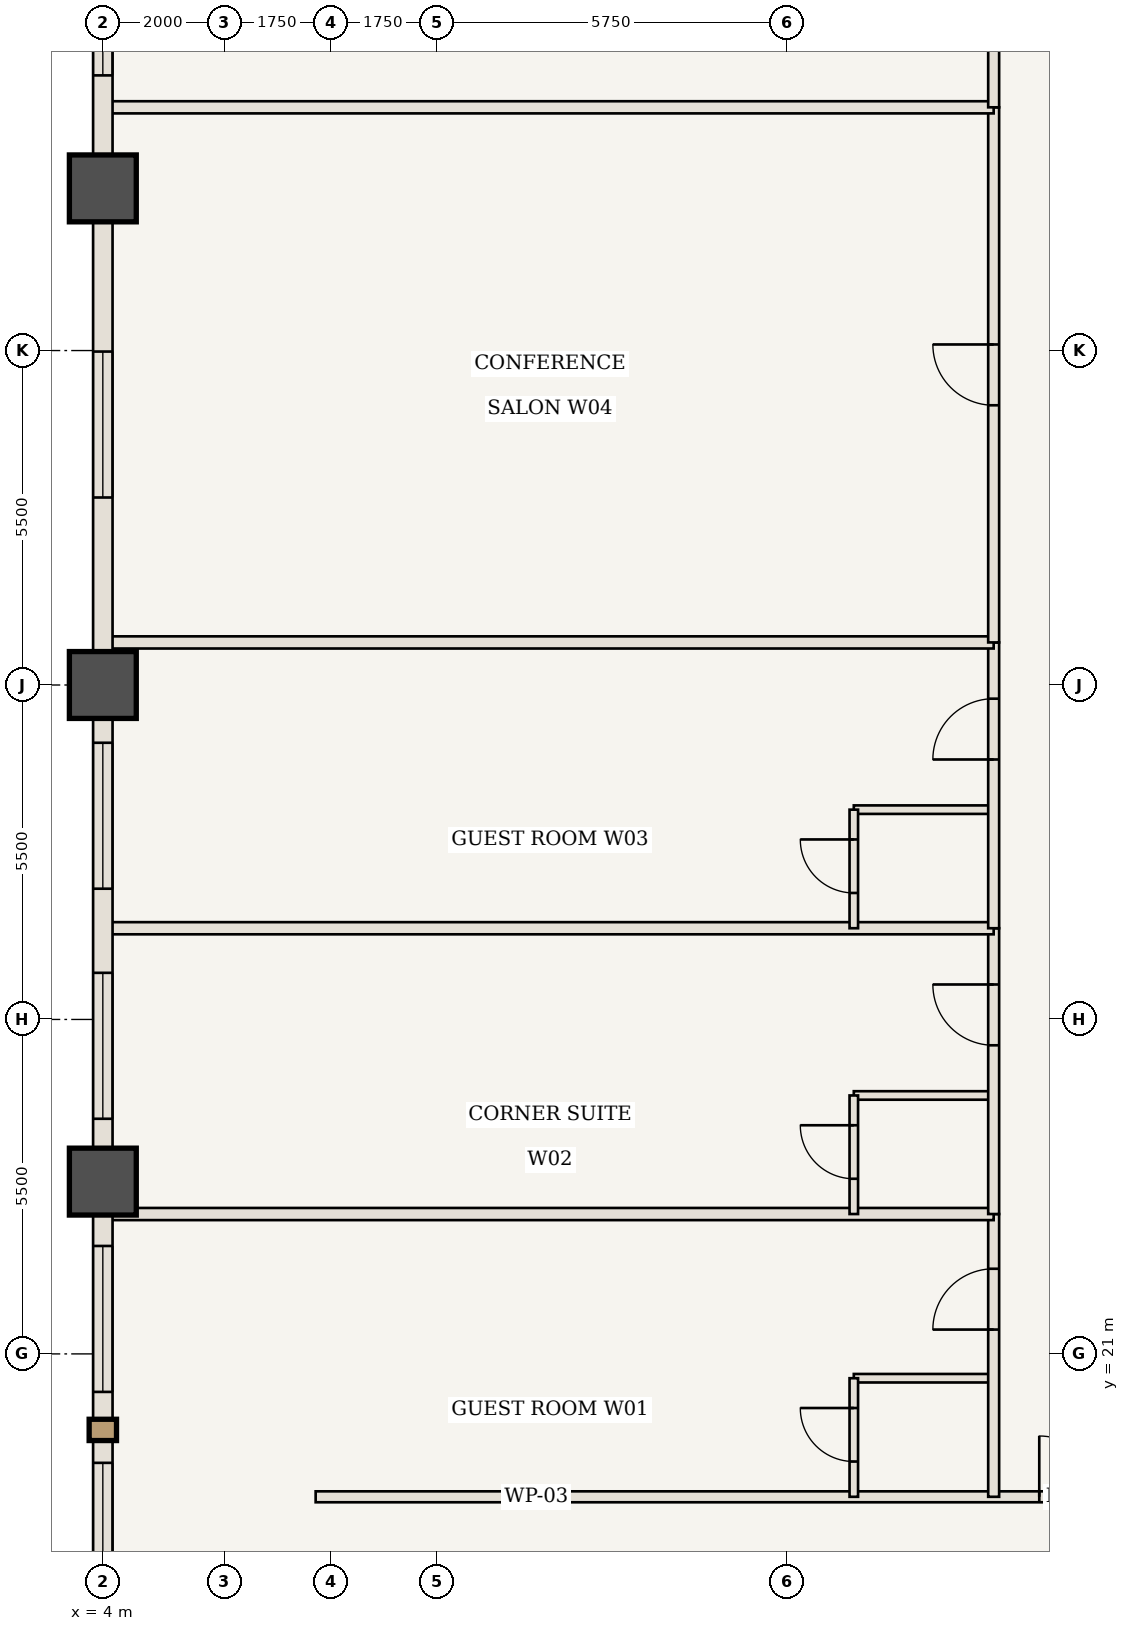
"""IFC4 building model, lengths in metres.
Left out: names, types, materials, properties, quantities, classifications, styles, units other than length and angle.
Written with IfcOpenShell. Run it as: python <this file> out.ifc"""

import sys

from ifc_helpers import new_model, si_unit, direction, frame, frame_2d, origin, origin_2d, place, context, subcontext, project, spatial, rectangle, extrude, element, fill, save


model = new_model("IFC4")
c1 = context("Model", 3, precision=1e-05, world=origin(), true_north=direction((0.0, 1.0)))
c2 = subcontext(c1, "Body", "Model", "MODEL_VIEW")
j1 = project(units=[si_unit("LENGTHUNIT", "METRE"), si_unit("PLANEANGLEUNIT", "RADIAN")], contexts=[c1])
p1 = place(None, origin())
s1 = spatial("IfcSite", under=j1, at=p1, CompositionType="ELEMENT")
p2 = place(p1, origin())
s2 = spatial("IfcBuilding", under=s1, at=p2, CompositionType="ELEMENT")
p3 = place(p2, frame((0.0, 0.0, 59.85)))
s3 = spatial("IfcBuildingStorey", under=s2, at=p3, CompositionType="ELEMENT", Elevation=59.85)
for number, where, z_axis, x_axis in (
    (1, (4.0, 23.833, 0.0), (0.0, 0.0, 1.0), (1.0, 0.0, 0.0)),
    (2, (4.0, 32.0, 0.0), (0.0, 0.0, 1.0), (1.0, 0.0, 0.0)),
    (3, (4.0, 40.167, 0.0), (0.0, 0.0, 1.0), (1.0, 0.0, 0.0)),
):
    element("IfcColumn", number, at=place(p3, frame(where, z_axis=z_axis, x_axis=x_axis)), inside=s3, PredefinedType="COLUMN", context=c2, shape_type="SweptSolid", body=[
        extrude(rectangle(XDim=1.1, YDim=1.1, at=origin_2d()), origin(), (0.0, 0.0, 1.0), 3.5),
    ])
p4 = place(p3, frame((7.5, 18.65, 0.0), z_axis=(0.0, 0.0, 1.0), x_axis=(1.0, 0.0, 0.0)))
e4 = element("IfcWall", 4, at=p4, inside=s3, PredefinedType="STANDARD", context=c2, shape_type="SweptSolid", body=[
    extrude(rectangle(XDim=16.5, YDim=0.18, at=frame_2d((8.25, 0.0))), origin(), (0.0, 0.0, 1.0), 3.32),
])
p5 = place(p4, frame((11.9, 0.0, 0.0)))
e5 = element("IfcOpeningElement", 5, at=p5, cuts=e4, PredefinedType="OPENING", context=c2, shape_type="SweptSolid", body=[
    extrude(rectangle(XDim=1.0, YDim=2.15, at=frame_2d((0.5, 1.075))), frame((0.0, 0.1, 0.0), z_axis=(0.0, -1.0, 0.0), x_axis=(1.0, 0.0, 0.0)), (0.0, 0.0, 1.0), 0.2),
])
p6 = place(p3, frame((16.35, 20.6, 0.0), z_axis=(0.0, 0.0, 1.0), x_axis=(1.0, 0.0, 0.0)))
e6 = element("IfcWall", 6, at=p6, inside=s3, PredefinedType="STANDARD", context=c2, shape_type="SweptSolid", body=[
    extrude(rectangle(XDim=2.3, YDim=0.14, at=frame_2d((1.15, 0.0))), origin(), (0.0, 0.0, 1.0), 2.615),
])
p7 = place(p3, frame((16.35, 18.65, 0.0), z_axis=(0.0, 0.0, 1.0), x_axis=(0.0, 1.0, 0.0)))
e7 = element("IfcWall", 7, at=p7, inside=s3, PredefinedType="STANDARD", context=c2, shape_type="SweptSolid", body=[
    extrude(rectangle(XDim=1.95, YDim=0.14, at=frame_2d((0.975, 0.0))), origin(), (0.0, 0.0, 1.0), 3.32),
])
p8 = place(p7, frame((0.58, 0.0, 0.0)))
e8 = element("IfcOpeningElement", 8, at=p8, cuts=e7, PredefinedType="OPENING", context=c2, shape_type="SweptSolid", body=[
    extrude(rectangle(XDim=0.88, YDim=2.1, at=frame_2d((0.44, 1.05))), frame((0.0, 0.08, 0.0), z_axis=(0.0, -1.0, 0.0), x_axis=(1.0, 0.0, 0.0)), (0.0, 0.0, 1.0), 0.16),
])
p9 = place(p3, frame((18.65, 18.65, 0.0), z_axis=(0.0, 0.0, 1.0), x_axis=(0.0, 1.0, 0.0)))
e9 = element("IfcWall", 9, at=p9, inside=s3, PredefinedType="STANDARD", context=c2, shape_type="SweptSolid", body=[
    extrude(rectangle(XDim=4.65, YDim=0.18, at=frame_2d((2.325, 0.0))), origin(), (0.0, 0.0, 1.0), 3.32),
])
p10 = place(p9, frame((2.75, 0.0, 0.0)))
e10 = element("IfcOpeningElement", 10, at=p10, cuts=e9, PredefinedType="OPENING", context=c2, shape_type="SweptSolid", body=[
    extrude(rectangle(XDim=1.0, YDim=2.15, at=frame_2d((0.5, 1.075))), frame((0.0, 0.1, 0.0), z_axis=(0.0, -1.0, 0.0), x_axis=(1.0, 0.0, 0.0)), (0.0, 0.0, 1.0), 0.2),
])
p11 = place(p3, frame((4.06, 23.3, 0.0), z_axis=(0.0, 0.0, 1.0), x_axis=(1.0, 0.0, 0.0)))
e11 = element("IfcWall", 11, at=p11, inside=s3, PredefinedType="STANDARD", context=c2, shape_type="SweptSolid", body=[
    extrude(rectangle(XDim=14.59, YDim=0.2, at=frame_2d((7.295, 0.0))), origin(), (0.0, 0.0, 1.0), 3.32),
])
p12 = place(p3, frame((16.35, 25.25, 0.0), z_axis=(0.0, 0.0, 1.0), x_axis=(1.0, 0.0, 0.0)))
e12 = element("IfcWall", 12, at=p12, inside=s3, PredefinedType="STANDARD", context=c2, shape_type="SweptSolid", body=[
    extrude(rectangle(XDim=2.3, YDim=0.14, at=frame_2d((1.15, 0.0))), origin(), (0.0, 0.0, 1.0), 3.32),
])
p13 = place(p3, frame((16.35, 23.3, 0.0), z_axis=(0.0, 0.0, 1.0), x_axis=(0.0, 1.0, 0.0)))
e13 = element("IfcWall", 13, at=p13, inside=s3, PredefinedType="STANDARD", context=c2, shape_type="SweptSolid", body=[
    extrude(rectangle(XDim=1.95, YDim=0.14, at=frame_2d((0.975, 0.0))), origin(), (0.0, 0.0, 1.0), 3.32),
])
p14 = place(p13, frame((0.58, 0.0, 0.0)))
e14 = element("IfcOpeningElement", 14, at=p14, cuts=e13, PredefinedType="OPENING", context=c2, shape_type="SweptSolid", body=[
    extrude(rectangle(XDim=0.88, YDim=2.1, at=frame_2d((0.44, 1.05))), frame((0.0, 0.08, 0.0), z_axis=(0.0, -1.0, 0.0), x_axis=(1.0, 0.0, 0.0)), (0.0, 0.0, 1.0), 0.16),
])
p15 = place(p3, frame((18.65, 23.3, 0.0), z_axis=(0.0, 0.0, 1.0), x_axis=(0.0, 1.0, 0.0)))
e15 = element("IfcWall", 15, at=p15, inside=s3, PredefinedType="STANDARD", context=c2, shape_type="SweptSolid", body=[
    extrude(rectangle(XDim=4.7, YDim=0.18, at=frame_2d((2.35, 0.0))), origin(), (0.0, 0.0, 1.0), 3.32),
])
p16 = place(p15, frame((2.775, 0.0, 0.0)))
e16 = element("IfcOpeningElement", 16, at=p16, cuts=e15, PredefinedType="OPENING", context=c2, shape_type="SweptSolid", body=[
    extrude(rectangle(XDim=1.0, YDim=2.15, at=frame_2d((0.5, 1.075))), frame((0.0, 0.1, 0.0), z_axis=(0.0, -1.0, 0.0), x_axis=(1.0, 0.0, 0.0)), (0.0, 0.0, 1.0), 0.2),
])
p17 = place(p3, frame((4.06, 28.0, 0.0), z_axis=(0.0, 0.0, 1.0), x_axis=(1.0, 0.0, 0.0)))
e17 = element("IfcWall", 17, at=p17, inside=s3, PredefinedType="STANDARD", context=c2, shape_type="SweptSolid", body=[
    extrude(rectangle(XDim=14.59, YDim=0.2, at=frame_2d((7.295, 0.0))), origin(), (0.0, 0.0, 1.0), 3.32),
])
p18 = place(p3, frame((16.35, 29.95, 0.0), z_axis=(0.0, 0.0, 1.0), x_axis=(1.0, 0.0, 0.0)))
e18 = element("IfcWall", 18, at=p18, inside=s3, PredefinedType="STANDARD", context=c2, shape_type="SweptSolid", body=[
    extrude(rectangle(XDim=2.3, YDim=0.14, at=frame_2d((1.15, 0.0))), origin(), (0.0, 0.0, 1.0), 3.32),
])
p19 = place(p3, frame((16.35, 28.0, 0.0), z_axis=(0.0, 0.0, 1.0), x_axis=(0.0, 1.0, 0.0)))
e19 = element("IfcWall", 19, at=p19, inside=s3, PredefinedType="STANDARD", context=c2, shape_type="SweptSolid", body=[
    extrude(rectangle(XDim=1.95, YDim=0.14, at=frame_2d((0.975, 0.0))), origin(), (0.0, 0.0, 1.0), 3.32),
])
p20 = place(p19, frame((0.58, 0.0, 0.0)))
e20 = element("IfcOpeningElement", 20, at=p20, cuts=e19, PredefinedType="OPENING", context=c2, shape_type="SweptSolid", body=[
    extrude(rectangle(XDim=0.88, YDim=2.1, at=frame_2d((0.44, 1.05))), frame((0.0, 0.08, 0.0), z_axis=(0.0, -1.0, 0.0), x_axis=(1.0, 0.0, 0.0)), (0.0, 0.0, 1.0), 0.16),
])
p21 = place(p3, frame((18.65, 28.0, 0.0), z_axis=(0.0, 0.0, 1.0), x_axis=(0.0, 1.0, 0.0)))
e21 = element("IfcWall", 21, at=p21, inside=s3, PredefinedType="STANDARD", context=c2, shape_type="SweptSolid", body=[
    extrude(rectangle(XDim=4.7, YDim=0.18, at=frame_2d((2.35, 0.0))), origin(), (0.0, 0.0, 1.0), 3.32),
])
p22 = place(p21, frame((2.775, 0.0, 0.0)))
e22 = element("IfcOpeningElement", 22, at=p22, cuts=e21, PredefinedType="OPENING", context=c2, shape_type="SweptSolid", body=[
    extrude(rectangle(XDim=1.0, YDim=2.15, at=frame_2d((0.5, 1.075))), frame((0.0, 0.1, 0.0), z_axis=(0.0, -1.0, 0.0), x_axis=(1.0, 0.0, 0.0)), (0.0, 0.0, 1.0), 0.2),
])
p23 = place(p3, frame((4.06, 32.7, 0.0), z_axis=(0.0, 0.0, 1.0), x_axis=(1.0, 0.0, 0.0)))
e23 = element("IfcWall", 23, at=p23, inside=s3, PredefinedType="STANDARD", context=c2, shape_type="SweptSolid", body=[
    extrude(rectangle(XDim=14.59, YDim=0.2, at=frame_2d((7.295, 0.0))), origin(), (0.0, 0.0, 1.0), 3.32),
])
p24 = place(p3, frame((18.65, 32.7, 0.0), z_axis=(0.0, 0.0, 1.0), x_axis=(0.0, 1.0, 0.0)))
e24 = element("IfcWall", 24, at=p24, inside=s3, PredefinedType="STANDARD", context=c2, shape_type="SweptSolid", body=[
    extrude(rectangle(XDim=8.8, YDim=0.18, at=frame_2d((4.4, 0.0))), origin(), (0.0, 0.0, 1.0), 3.32),
])
p25 = place(p24, frame((3.9, 0.0, 0.0)))
e25 = element("IfcOpeningElement", 25, at=p25, cuts=e24, PredefinedType="OPENING", context=c2, shape_type="SweptSolid", body=[
    extrude(rectangle(XDim=1.0, YDim=2.15, at=frame_2d((0.5, 1.075))), frame((0.0, 0.1, 0.0), z_axis=(0.0, -1.0, 0.0), x_axis=(1.0, 0.0, 0.0)), (0.0, 0.0, 1.0), 0.2),
])
p26 = place(p3, frame((4.06, 41.5, 0.0), z_axis=(0.0, 0.0, 1.0), x_axis=(1.0, 0.0, 0.0)))
e26 = element("IfcWall", 26, at=p26, inside=s3, PredefinedType="STANDARD", context=c2, shape_type="SweptSolid", body=[
    extrude(rectangle(XDim=14.59, YDim=0.2, at=frame_2d((7.295, 0.0))), origin(), (0.0, 0.0, 1.0), 3.32),
])
p27 = place(p3, frame((18.65, 41.5, 0.0), z_axis=(0.0, 0.0, 1.0), x_axis=(0.0, 1.0, 0.0)))
e27 = element("IfcWall", 27, at=p27, inside=s3, PredefinedType="STANDARD", context=c2, shape_type="SweptSolid", body=[
    extrude(rectangle(XDim=3.85, YDim=0.18, at=frame_2d((1.925, 0.0))), origin(), (0.0, 0.0, 1.0), 3.32),
])
p28 = place(p27, frame((1.425, 0.0, 0.0)))
e28 = element("IfcOpeningElement", 28, at=p28, cuts=e27, PredefinedType="OPENING", context=c2, shape_type="SweptSolid", body=[
    extrude(rectangle(XDim=1.0, YDim=2.15, at=frame_2d((0.5, 1.075))), frame((0.0, 0.1, 0.0), z_axis=(0.0, -1.0, 0.0), x_axis=(1.0, 0.0, 0.0)), (0.0, 0.0, 1.0), 0.2),
])
p29 = place(p3, frame((4.0, 15.667, 0.0), z_axis=(0.0, 0.0, 1.0), x_axis=(0.0, 1.0, 0.0)))
e29 = element("IfcWall", 29, at=p29, inside=s3, PredefinedType="USERDEFINED", context=c2, shape_type="SweptSolid", body=[
    extrude(rectangle(XDim=8.167, YDim=0.32, at=frame_2d((4.083, 0.0))), origin(), (0.0, 0.0, 1.0), 2.52),
])
p30 = place(p29, frame((0.742, 0.0, 0.85)))
e30 = element("IfcOpeningElement", 30, at=p30, cuts=e29, PredefinedType="OPENING", context=c2, shape_type="SweptSolid", body=[
    extrude(rectangle(XDim=2.8, YDim=1.47, at=frame_2d((1.4, 0.735))), frame((0.0, 0.17, 0.0), z_axis=(0.0, -1.0, 0.0), x_axis=(1.0, 0.0, 0.0)), (0.0, 0.0, 1.0), 0.34),
])
p31 = place(p29, frame((4.708, 0.0, 0.85)))
e31 = element("IfcOpeningElement", 31, at=p31, cuts=e29, PredefinedType="OPENING", context=c2, shape_type="SweptSolid", body=[
    extrude(rectangle(XDim=2.4, YDim=1.47, at=frame_2d((1.2, 0.735))), frame((0.0, 0.17, 0.0), z_axis=(0.0, -1.0, 0.0), x_axis=(1.0, 0.0, 0.0)), (0.0, 0.0, 1.0), 0.34),
])
p32 = place(p3, frame((4.0, 23.833, 0.0), z_axis=(0.0, 0.0, 1.0), x_axis=(0.0, 1.0, 0.0)))
e32 = element("IfcWall", 32, at=p32, inside=s3, PredefinedType="USERDEFINED", context=c2, shape_type="SweptSolid", body=[
    extrude(rectangle(XDim=8.167, YDim=0.32, at=frame_2d((4.083, 0.0))), origin(), (0.0, 0.0, 1.0), 2.52),
])
p33 = place(p32, frame((1.033, 0.0, 0.85)))
e33 = element("IfcOpeningElement", 33, at=p33, cuts=e32, PredefinedType="OPENING", context=c2, shape_type="SweptSolid", body=[
    extrude(rectangle(XDim=2.4, YDim=1.47, at=frame_2d((1.2, 0.735))), frame((0.0, 0.17, 0.0), z_axis=(0.0, -1.0, 0.0), x_axis=(1.0, 0.0, 0.0)), (0.0, 0.0, 1.0), 0.34),
])
p34 = place(p32, frame((4.817, 0.0, 0.85)))
e34 = element("IfcOpeningElement", 34, at=p34, cuts=e32, PredefinedType="OPENING", context=c2, shape_type="SweptSolid", body=[
    extrude(rectangle(XDim=2.4, YDim=1.47, at=frame_2d((1.2, 0.735))), frame((0.0, 0.17, 0.0), z_axis=(0.0, -1.0, 0.0), x_axis=(1.0, 0.0, 0.0)), (0.0, 0.0, 1.0), 0.34),
])
p35 = place(p3, frame((4.0, 32.0, 0.0), z_axis=(0.0, 0.0, 1.0), x_axis=(0.0, 1.0, 0.0)))
e35 = element("IfcWall", 35, at=p35, inside=s3, PredefinedType="USERDEFINED", context=c2, shape_type="SweptSolid", body=[
    extrude(rectangle(XDim=8.167, YDim=0.32, at=frame_2d((4.083, 0.0))), origin(), (0.0, 0.0, 1.0), 2.52),
])
p36 = place(p35, frame((3.083, 0.0, 0.85)))
e36 = element("IfcOpeningElement", 36, at=p36, cuts=e35, PredefinedType="OPENING", context=c2, shape_type="SweptSolid", body=[
    extrude(rectangle(XDim=2.4, YDim=1.47, at=frame_2d((1.2, 0.735))), frame((0.0, 0.17, 0.0), z_axis=(0.0, -1.0, 0.0), x_axis=(1.0, 0.0, 0.0)), (0.0, 0.0, 1.0), 0.34),
])
p37 = place(p3, frame((4.0, 40.167, 0.0), z_axis=(0.0, 0.0, 1.0), x_axis=(0.0, 1.0, 0.0)))
e37 = element("IfcWall", 37, at=p37, inside=s3, PredefinedType="USERDEFINED", context=c2, shape_type="SweptSolid", body=[
    extrude(rectangle(XDim=8.167, YDim=0.32, at=frame_2d((4.083, 0.0))), origin(), (0.0, 0.0, 1.0), 2.52),
])
p38 = place(p37, frame((1.858, 0.0, 0.85)))
e38 = element("IfcOpeningElement", 38, at=p38, cuts=e37, PredefinedType="OPENING", context=c2, shape_type="SweptSolid", body=[
    extrude(rectangle(XDim=1.6, YDim=1.47, at=frame_2d((0.8, 0.735))), frame((0.0, 0.17, 0.0), z_axis=(0.0, -1.0, 0.0), x_axis=(1.0, 0.0, 0.0)), (0.0, 0.0, 1.0), 0.34),
])
p39 = place(p37, frame((4.625, 0.0, 0.85)))
e39 = element("IfcOpeningElement", 39, at=p39, cuts=e37, PredefinedType="OPENING", context=c2, shape_type="SweptSolid", body=[
    extrude(rectangle(XDim=2.8, YDim=1.47, at=frame_2d((1.4, 0.735))), frame((0.0, 0.17, 0.0), z_axis=(0.0, -1.0, 0.0), x_axis=(1.0, 0.0, 0.0)), (0.0, 0.0, 1.0), 0.34),
])
p40 = place(p5, origin())
e40 = element("IfcDoor", 40, at=p40, inside=s3, OperationType="SINGLE_SWING_LEFT", PredefinedType="DOOR", context=c2, shape_type="SweptSolid", body=[
    extrude(rectangle(XDim=1.0, YDim=2.15, at=frame_2d((0.5, 1.075))), frame((0.0, 0.025, 0.0), z_axis=(0.0, -1.0, 0.0), x_axis=(1.0, 0.0, 0.0)), (0.0, 0.0, 1.0), 0.05),
])
fill(e5, e40)
p41 = place(p8, origin())
e41 = element("IfcDoor", 41, at=p41, inside=s3, OperationType="SINGLE_SWING_RIGHT", PredefinedType="DOOR", context=c2, shape_type="SweptSolid", body=[
    extrude(rectangle(XDim=0.88, YDim=2.1, at=frame_2d((0.44, 1.05))), frame((0.0, 0.025, 0.0), z_axis=(0.0, -1.0, 0.0), x_axis=(1.0, 0.0, 0.0)), (0.0, 0.0, 1.0), 0.05),
])
fill(e8, e41)
p42 = place(p10, origin())
e42 = element("IfcDoor", 42, at=p42, inside=s3, OperationType="SINGLE_SWING_LEFT", PredefinedType="DOOR", context=c2, shape_type="SweptSolid", body=[
    extrude(rectangle(XDim=1.0, YDim=2.15, at=frame_2d((0.5, 1.075))), frame((0.0, 0.025, 0.0), z_axis=(0.0, -1.0, 0.0), x_axis=(1.0, 0.0, 0.0)), (0.0, 0.0, 1.0), 0.05),
])
fill(e10, e42)
p43 = place(p14, origin())
e43 = element("IfcDoor", 43, at=p43, inside=s3, OperationType="SINGLE_SWING_RIGHT", PredefinedType="DOOR", context=c2, shape_type="SweptSolid", body=[
    extrude(rectangle(XDim=0.88, YDim=2.1, at=frame_2d((0.44, 1.05))), frame((0.0, 0.025, 0.0), z_axis=(0.0, -1.0, 0.0), x_axis=(1.0, 0.0, 0.0)), (0.0, 0.0, 1.0), 0.05),
])
fill(e14, e43)
p44 = place(p16, origin())
e44 = element("IfcDoor", 44, at=p44, inside=s3, OperationType="SINGLE_SWING_RIGHT", PredefinedType="DOOR", context=c2, shape_type="SweptSolid", body=[
    extrude(rectangle(XDim=1.0, YDim=2.15, at=frame_2d((0.5, 1.075))), frame((0.0, 0.025, 0.0), z_axis=(0.0, -1.0, 0.0), x_axis=(1.0, 0.0, 0.0)), (0.0, 0.0, 1.0), 0.05),
])
fill(e16, e44)
p45 = place(p20, origin())
e45 = element("IfcDoor", 45, at=p45, inside=s3, OperationType="SINGLE_SWING_RIGHT", PredefinedType="DOOR", context=c2, shape_type="SweptSolid", body=[
    extrude(rectangle(XDim=0.88, YDim=2.1, at=frame_2d((0.44, 1.05))), frame((0.0, 0.025, 0.0), z_axis=(0.0, -1.0, 0.0), x_axis=(1.0, 0.0, 0.0)), (0.0, 0.0, 1.0), 0.05),
])
fill(e20, e45)
p46 = place(p22, origin())
e46 = element("IfcDoor", 46, at=p46, inside=s3, OperationType="SINGLE_SWING_LEFT", PredefinedType="DOOR", context=c2, shape_type="SweptSolid", body=[
    extrude(rectangle(XDim=1.0, YDim=2.15, at=frame_2d((0.5, 1.075))), frame((0.0, 0.025, 0.0), z_axis=(0.0, -1.0, 0.0), x_axis=(1.0, 0.0, 0.0)), (0.0, 0.0, 1.0), 0.05),
])
fill(e22, e46)
p47 = place(p25, origin())
e47 = element("IfcDoor", 47, at=p47, inside=s3, OperationType="SINGLE_SWING_RIGHT", PredefinedType="DOOR", context=c2, shape_type="SweptSolid", body=[
    extrude(rectangle(XDim=1.0, YDim=2.15, at=frame_2d((0.5, 1.075))), frame((0.0, 0.025, 0.0), z_axis=(0.0, -1.0, 0.0), x_axis=(1.0, 0.0, 0.0)), (0.0, 0.0, 1.0), 0.05),
])
fill(e25, e47)
p48 = place(p30, origin())
e48 = element("IfcWindow", 48, at=p48, inside=s3, PartitioningType="SINGLE_PANEL", PredefinedType="WINDOW", context=c2, shape_type="SweptSolid", body=[
    extrude(rectangle(XDim=2.8, YDim=1.47, at=frame_2d((1.4, 0.735))), frame((0.0, 0.03, 0.0), z_axis=(0.0, -1.0, 0.0), x_axis=(1.0, 0.0, 0.0)), (0.0, 0.0, 1.0), 0.06),
])
fill(e30, e48)
p49 = place(p31, origin())
e49 = element("IfcWindow", 49, at=p49, inside=s3, PartitioningType="SINGLE_PANEL", PredefinedType="WINDOW", context=c2, shape_type="SweptSolid", body=[
    extrude(rectangle(XDim=2.4, YDim=1.47, at=frame_2d((1.2, 0.735))), frame((0.0, 0.03, 0.0), z_axis=(0.0, -1.0, 0.0), x_axis=(1.0, 0.0, 0.0)), (0.0, 0.0, 1.0), 0.06),
])
fill(e31, e49)
p50 = place(p33, origin())
e50 = element("IfcWindow", 50, at=p50, inside=s3, PartitioningType="SINGLE_PANEL", PredefinedType="WINDOW", context=c2, shape_type="SweptSolid", body=[
    extrude(rectangle(XDim=2.4, YDim=1.47, at=frame_2d((1.2, 0.735))), frame((0.0, 0.03, 0.0), z_axis=(0.0, -1.0, 0.0), x_axis=(1.0, 0.0, 0.0)), (0.0, 0.0, 1.0), 0.06),
])
fill(e33, e50)
p51 = place(p34, origin())
e51 = element("IfcWindow", 51, at=p51, inside=s3, PartitioningType="SINGLE_PANEL", PredefinedType="WINDOW", context=c2, shape_type="SweptSolid", body=[
    extrude(rectangle(XDim=2.4, YDim=1.47, at=frame_2d((1.2, 0.735))), frame((0.0, 0.03, 0.0), z_axis=(0.0, -1.0, 0.0), x_axis=(1.0, 0.0, 0.0)), (0.0, 0.0, 1.0), 0.06),
])
fill(e34, e51)
p52 = place(p36, origin())
e52 = element("IfcWindow", 52, at=p52, inside=s3, PartitioningType="SINGLE_PANEL", PredefinedType="WINDOW", context=c2, shape_type="SweptSolid", body=[
    extrude(rectangle(XDim=2.4, YDim=1.47, at=frame_2d((1.2, 0.735))), frame((0.0, 0.03, 0.0), z_axis=(0.0, -1.0, 0.0), x_axis=(1.0, 0.0, 0.0)), (0.0, 0.0, 1.0), 0.06),
])
fill(e36, e52)
p53 = place(p38, origin())
e53 = element("IfcWindow", 53, at=p53, inside=s3, PartitioningType="SINGLE_PANEL", PredefinedType="WINDOW", context=c2, shape_type="SweptSolid", body=[
    extrude(rectangle(XDim=1.6, YDim=1.47, at=frame_2d((0.8, 0.735))), frame((0.0, 0.03, 0.0), z_axis=(0.0, -1.0, 0.0), x_axis=(1.0, 0.0, 0.0)), (0.0, 0.0, 1.0), 0.06),
])
fill(e38, e53)
save(model, sys.argv[1])
